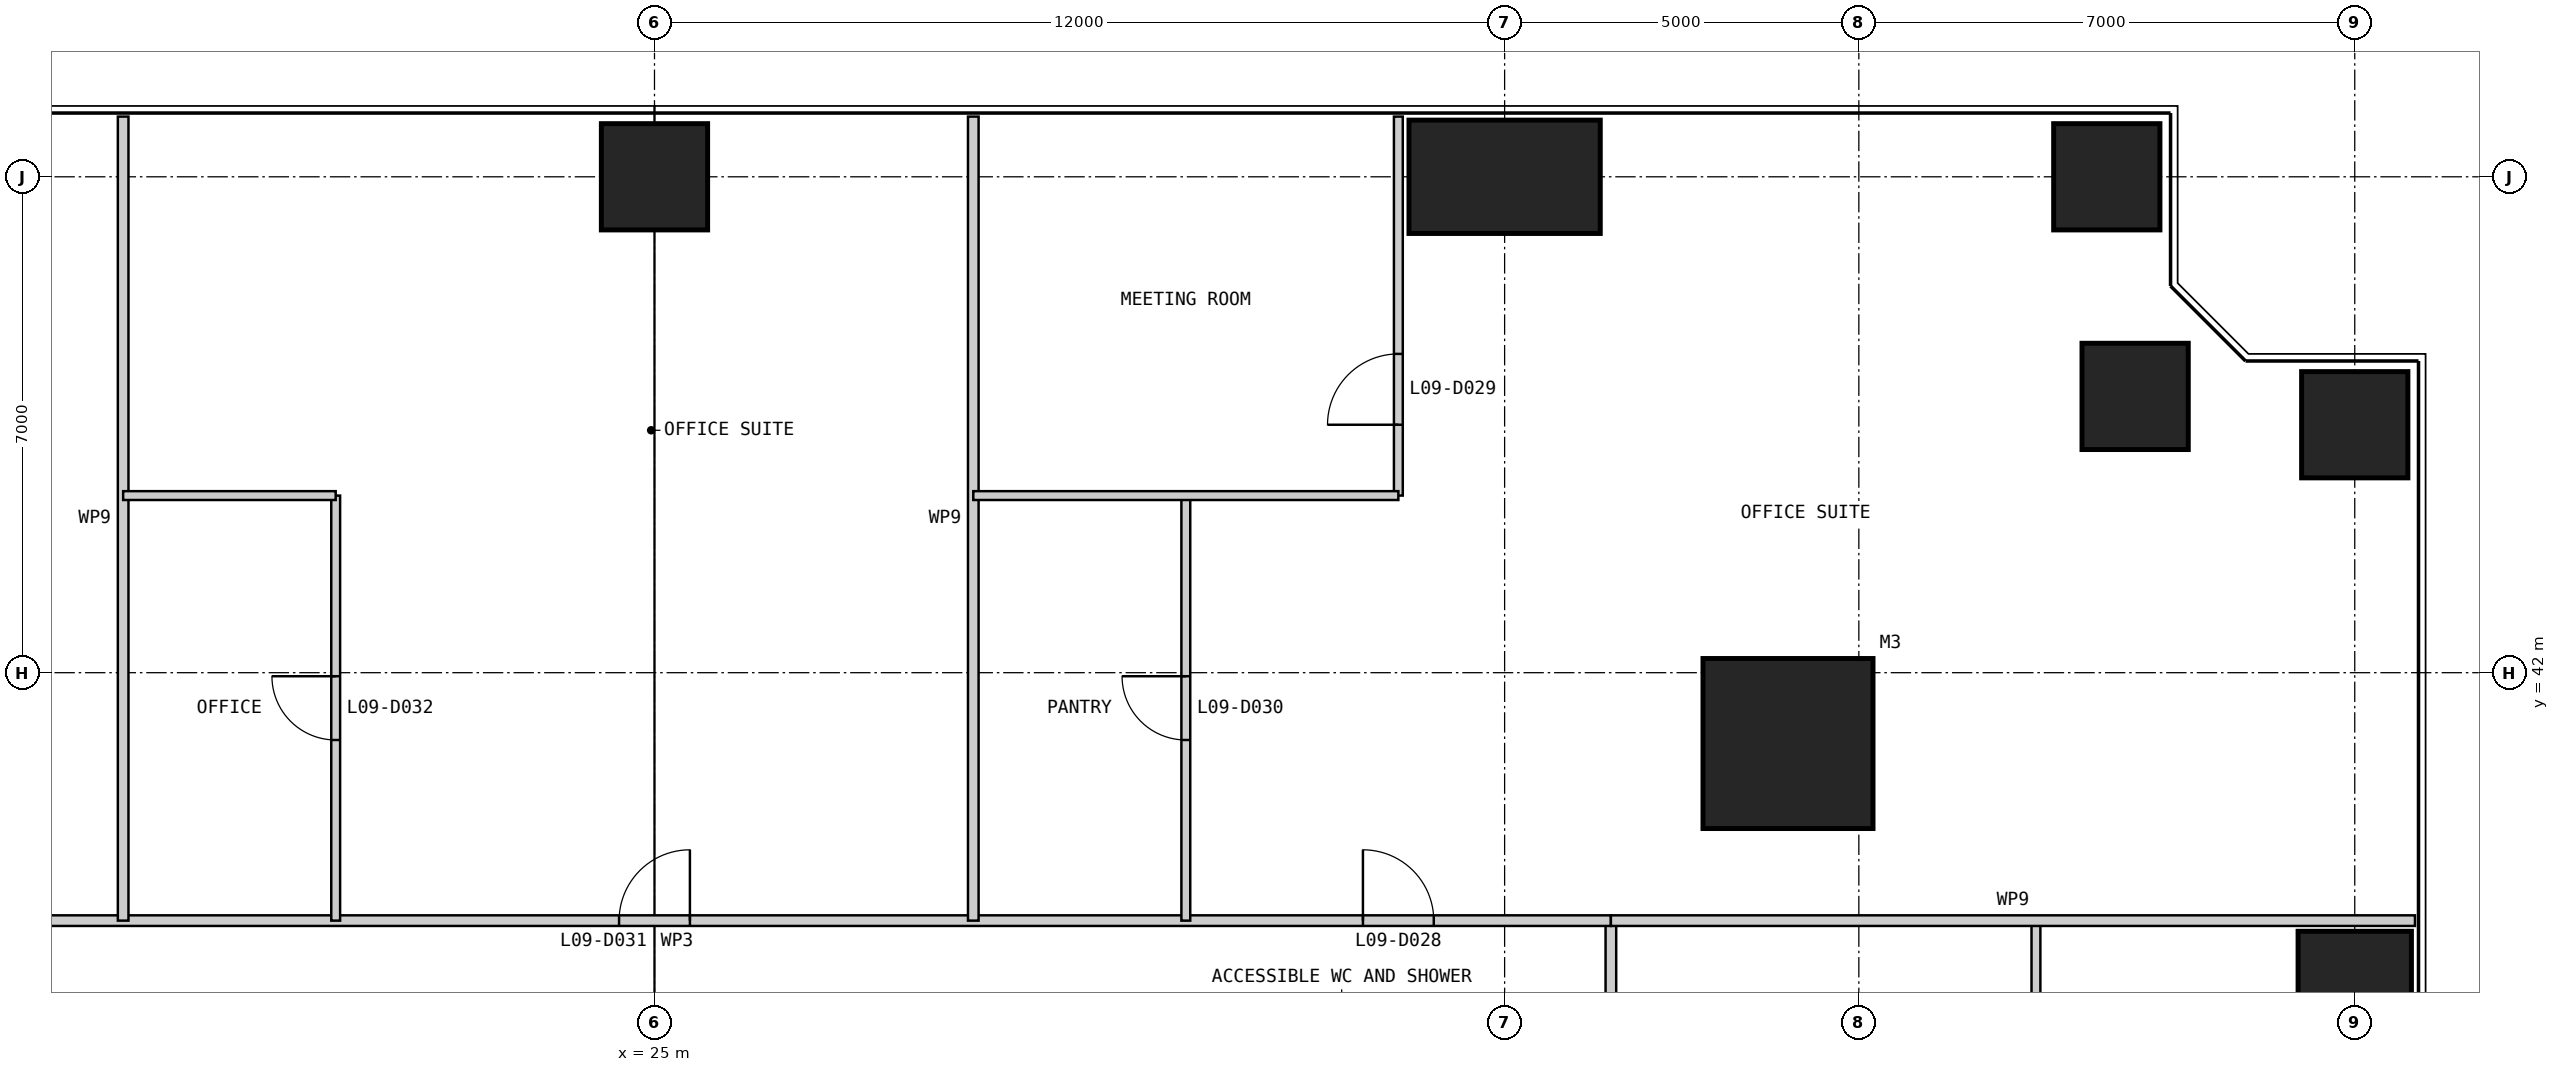
"""IFC4 building model, lengths in metres.
Left out: names, types, materials, properties, quantities, classifications, styles, units other than length and angle.
Written with IfcOpenShell. Run it as: python <this file> out.ifc"""

import sys

from ifc_helpers import new_model, si_unit, direction, frame, frame_2d, origin, origin_2d, place, context, subcontext, project, spatial, rectangle, extrude, element, fill, save


model = new_model("IFC4")
c1 = context("Model", 3, precision=1e-05, world=origin(), true_north=direction((0.0, 1.0)))
c2 = subcontext(c1, "Body", "Model", "MODEL_VIEW")
j1 = project(units=[si_unit("LENGTHUNIT", "METRE"), si_unit("PLANEANGLEUNIT", "RADIAN")], contexts=[c1])
p1 = place(None, origin())
s1 = spatial("IfcSite", under=j1, at=p1, CompositionType="ELEMENT")
p2 = place(p1, origin())
s2 = spatial("IfcBuilding", under=s1, at=p2, CompositionType="ELEMENT")
p3 = place(p2, frame((0.0, 0.0, 43.0)))
s3 = spatial("IfcBuildingStorey", under=s2, at=p3, CompositionType="ELEMENT", Elevation=43.0)
p4 = place(p3, frame((41.0, 41.0, 0.0), z_axis=(0.0, 0.0, 1.0), x_axis=(1.0, 0.0, 0.0)))
e1 = element("IfcColumn", 1, at=p4, inside=s3, PredefinedType="COLUMN", context=c2, shape_type="SweptSolid", body=[
    extrude(rectangle(XDim=2.4, YDim=2.4, at=origin_2d()), origin(), (0.0, 0.0, 1.0), 4.0),
])
p5 = place(p3, frame((49.0, 37.0, 0.0), z_axis=(0.0, 0.0, 1.0), x_axis=(1.0, 0.0, 0.0)))
e2 = element("IfcColumn", 2, at=p5, inside=s3, PredefinedType="COLUMN", context=c2, shape_type="SweptSolid", body=[
    extrude(rectangle(XDim=1.6, YDim=2.7, at=origin_2d()), origin(), (0.0, 0.0, 1.0), 4.0),
])
for number, where, z_axis, x_axis in (
    (3, (49.0, 45.5, 0.0), (0.0, 0.0, 1.0), (1.0, 0.0, 0.0)),
    (4, (45.9, 45.9, 0.0), (0.0, 0.0, 1.0), (1.0, 0.0, 0.0)),
    (5, (45.5, 49.0, 0.0), (0.0, 0.0, 1.0), (1.0, 0.0, 0.0)),
):
    element("IfcColumn", number, at=place(p3, frame(where, z_axis=z_axis, x_axis=x_axis)), inside=s3, PredefinedType="COLUMN", context=c2, shape_type="SweptSolid", body=[
        extrude(rectangle(XDim=1.5, YDim=1.5, at=origin_2d()), origin(), (0.0, 0.0, 1.0), 4.0),
    ])
p6 = place(p3, frame((37.0, 49.0, 0.0), z_axis=(0.0, 0.0, 1.0), x_axis=(1.0, 0.0, 0.0)))
e6 = element("IfcColumn", 6, at=p6, inside=s3, PredefinedType="COLUMN", context=c2, shape_type="SweptSolid", body=[
    extrude(rectangle(XDim=2.7, YDim=1.6, at=origin_2d()), origin(), (0.0, 0.0, 1.0), 4.0),
])
p7 = place(p3, frame((25.0, 49.0, 0.0), z_axis=(0.0, 0.0, 1.0), x_axis=(1.0, 0.0, 0.0)))
e7 = element("IfcColumn", 7, at=p7, inside=s3, PredefinedType="COLUMN", context=c2, shape_type="SweptSolid", body=[
    extrude(rectangle(XDim=1.5, YDim=1.5, at=origin_2d()), origin(), (0.0, 0.0, 1.0), 4.0),
])
p8 = place(p3, frame((38.5, 11.5, 0.0), z_axis=(0.0, 0.0, 1.0), x_axis=(0.0, 1.0, 0.0)))
e8 = element("IfcWall", 8, at=p8, inside=s3, PredefinedType="PARTITIONING", context=c2, shape_type="SweptSolid", body=[
    extrude(rectangle(XDim=27.0, YDim=0.15, at=frame_2d((13.5, 0.0))), origin(), (0.0, 0.0, 1.0), 3.85),
])
p9 = place(p8, frame((11.5, 0.0, 0.0)))
e9 = element("IfcOpeningElement", 9, at=p9, cuts=e8, PredefinedType="OPENING", context=c2, shape_type="SweptSolid", body=[
    extrude(rectangle(XDim=1.0, YDim=2.2, at=frame_2d((0.5, 1.1))), frame((0.0, 0.085, 0.0), z_axis=(0.0, -1.0, 0.0), x_axis=(1.0, 0.0, 0.0)), (0.0, 0.0, 1.0), 0.17),
])
p10 = place(p3, frame((44.5, 14.5, 0.0), z_axis=(0.0, 0.0, 1.0), x_axis=(0.0, 1.0, 0.0)))
e10 = element("IfcWall", 10, at=p10, inside=s3, PredefinedType="PARTITIONING", context=c2, shape_type="SweptSolid", body=[
    extrude(rectangle(XDim=24.0, YDim=0.125, at=frame_2d((12.0, 0.0))), origin(), (0.0, 0.0, 1.0), 3.85),
])
p11 = place(p10, frame((10.05, 0.0, 0.0)))
e11 = element("IfcOpeningElement", 11, at=p11, cuts=e10, PredefinedType="OPENING", context=c2, shape_type="SweptSolid", body=[
    extrude(rectangle(XDim=0.9, YDim=2.2, at=frame_2d((0.45, 1.1))), frame((0.0, 0.073, 0.0), z_axis=(0.0, -1.0, 0.0), x_axis=(1.0, 0.0, 0.0)), (0.0, 0.0, 1.0), 0.145),
])
p12 = place(p10, frame((16.05, 0.0, 0.0)))
e12 = element("IfcOpeningElement", 12, at=p12, cuts=e10, PredefinedType="OPENING", context=c2, shape_type="SweptSolid", body=[
    extrude(rectangle(XDim=0.9, YDim=2.2, at=frame_2d((0.45, 1.1))), frame((0.0, 0.073, 0.0), z_axis=(0.0, -1.0, 0.0), x_axis=(1.0, 0.0, 0.0)), (0.0, 0.0, 1.0), 0.145),
])
p13 = place(p10, frame((19.05, 0.0, 0.0)))
e13 = element("IfcOpeningElement", 13, at=p13, cuts=e10, PredefinedType="OPENING", context=c2, shape_type="SweptSolid", body=[
    extrude(rectangle(XDim=0.9, YDim=2.2, at=frame_2d((0.45, 1.1))), frame((0.0, 0.073, 0.0), z_axis=(0.0, -1.0, 0.0), x_axis=(1.0, 0.0, 0.0)), (0.0, 0.0, 1.0), 0.145),
])
p14 = place(p3, frame((38.5, 38.5, 0.0), z_axis=(0.0, 0.0, 1.0), x_axis=(-1.0, 0.0, 0.0)))
e14 = element("IfcWall", 14, at=p14, inside=s3, PredefinedType="PARTITIONING", context=c2, shape_type="SweptSolid", body=[
    extrude(rectangle(XDim=27.0, YDim=0.15, at=frame_2d((13.5, 0.0))), origin(), (0.0, 0.0, 1.0), 3.85),
])
p15 = place(p14, frame((2.5, 0.0, 0.0)))
e15 = element("IfcOpeningElement", 15, at=p15, cuts=e14, PredefinedType="OPENING", context=c2, shape_type="SweptSolid", body=[
    extrude(rectangle(XDim=1.0, YDim=2.2, at=frame_2d((0.5, 1.1))), frame((0.0, 0.085, 0.0), z_axis=(0.0, -1.0, 0.0), x_axis=(1.0, 0.0, 0.0)), (0.0, 0.0, 1.0), 0.17),
])
p16 = place(p14, frame((13.0, 0.0, 0.0)))
e16 = element("IfcOpeningElement", 16, at=p16, cuts=e14, PredefinedType="OPENING", context=c2, shape_type="SweptSolid", body=[
    extrude(rectangle(XDim=1.0, YDim=2.2, at=frame_2d((0.5, 1.1))), frame((0.0, 0.085, 0.0), z_axis=(0.0, -1.0, 0.0), x_axis=(1.0, 0.0, 0.0)), (0.0, 0.0, 1.0), 0.17),
])
p17 = place(p14, frame((23.5, 0.0, 0.0)))
e17 = element("IfcOpeningElement", 17, at=p17, cuts=e14, PredefinedType="OPENING", context=c2, shape_type="SweptSolid", body=[
    extrude(rectangle(XDim=1.0, YDim=2.2, at=frame_2d((0.5, 1.1))), frame((0.0, 0.085, 0.0), z_axis=(0.0, -1.0, 0.0), x_axis=(1.0, 0.0, 0.0)), (0.0, 0.0, 1.0), 0.17),
])
p18 = place(p3, frame((49.85, 38.5, 0.0), z_axis=(0.0, 0.0, 1.0), x_axis=(-1.0, 0.0, 0.0)))
e18 = element("IfcWall", 18, at=p18, inside=s3, PredefinedType="PARTITIONING", context=c2, shape_type="SweptSolid", body=[
    extrude(rectangle(XDim=11.35, YDim=0.15, at=frame_2d((5.675, 0.0))), origin(), (0.0, 0.0, 1.0), 3.85),
])
p19 = place(p3, frame((35.5, 49.85, 0.0), z_axis=(0.0, 0.0, 1.0), x_axis=(0.0, -1.0, 0.0)))
e19 = element("IfcWall", 19, at=p19, inside=s3, PredefinedType="PARTITIONING", context=c2, shape_type="SweptSolid", body=[
    extrude(rectangle(XDim=5.35, YDim=0.125, at=frame_2d((2.675, 0.0))), origin(), (0.0, 0.0, 1.0), 3.85),
])
p20 = place(p19, frame((3.35, 0.0, 0.0)))
e20 = element("IfcOpeningElement", 20, at=p20, cuts=e19, PredefinedType="OPENING", context=c2, shape_type="SweptSolid", body=[
    extrude(rectangle(XDim=1.0, YDim=2.2, at=frame_2d((0.5, 1.1))), frame((0.0, 0.073, 0.0), z_axis=(0.0, -1.0, 0.0), x_axis=(1.0, 0.0, 0.0)), (0.0, 0.0, 1.0), 0.145),
])
p21 = place(p3, frame((32.5, 44.5, 0.0), z_axis=(0.0, 0.0, 1.0), x_axis=(0.0, -1.0, 0.0)))
e21 = element("IfcWall", 21, at=p21, inside=s3, PredefinedType="PARTITIONING", context=c2, shape_type="SweptSolid", body=[
    extrude(rectangle(XDim=6.0, YDim=0.125, at=frame_2d((3.0, 0.0))), origin(), (0.0, 0.0, 1.0), 3.85),
])
p22 = place(p21, frame((2.55, 0.0, 0.0)))
e22 = element("IfcOpeningElement", 22, at=p22, cuts=e21, PredefinedType="OPENING", context=c2, shape_type="SweptSolid", body=[
    extrude(rectangle(XDim=0.9, YDim=2.2, at=frame_2d((0.45, 1.1))), frame((0.0, 0.073, 0.0), z_axis=(0.0, -1.0, 0.0), x_axis=(1.0, 0.0, 0.0)), (0.0, 0.0, 1.0), 0.145),
])
p23 = place(p3, frame((29.5, 49.85, 0.0), z_axis=(0.0, 0.0, 1.0), x_axis=(0.0, -1.0, 0.0)))
e23 = element("IfcWall", 23, at=p23, inside=s3, PredefinedType="PARTITIONING", context=c2, shape_type="SweptSolid", body=[
    extrude(rectangle(XDim=11.35, YDim=0.15, at=frame_2d((5.675, 0.0))), origin(), (0.0, 0.0, 1.0), 3.85),
])
p24 = place(p3, frame((20.5, 44.5, 0.0), z_axis=(0.0, 0.0, 1.0), x_axis=(0.0, -1.0, 0.0)))
e24 = element("IfcWall", 24, at=p24, inside=s3, PredefinedType="PARTITIONING", context=c2, shape_type="SweptSolid", body=[
    extrude(rectangle(XDim=6.0, YDim=0.125, at=frame_2d((3.0, 0.0))), origin(), (0.0, 0.0, 1.0), 3.85),
])
p25 = place(p24, frame((2.55, 0.0, 0.0)))
e25 = element("IfcOpeningElement", 25, at=p25, cuts=e24, PredefinedType="OPENING", context=c2, shape_type="SweptSolid", body=[
    extrude(rectangle(XDim=0.9, YDim=2.2, at=frame_2d((0.45, 1.1))), frame((0.0, 0.073, 0.0), z_axis=(0.0, -1.0, 0.0), x_axis=(1.0, 0.0, 0.0)), (0.0, 0.0, 1.0), 0.145),
])
p26 = place(p3, frame((17.5, 49.85, 0.0), z_axis=(0.0, 0.0, 1.0), x_axis=(0.0, -1.0, 0.0)))
e26 = element("IfcWall", 26, at=p26, inside=s3, PredefinedType="PARTITIONING", context=c2, shape_type="SweptSolid", body=[
    extrude(rectangle(XDim=11.35, YDim=0.15, at=frame_2d((5.675, 0.0))), origin(), (0.0, 0.0, 1.0), 3.85),
])
p27 = place(p3, frame((35.5, 44.5, 0.0), z_axis=(0.0, 0.0, 1.0), x_axis=(-1.0, 0.0, 0.0)))
e27 = element("IfcWall", 27, at=p27, inside=s3, PredefinedType="PARTITIONING", context=c2, shape_type="SweptSolid", body=[
    extrude(rectangle(XDim=6.0, YDim=0.125, at=frame_2d((3.0, 0.0))), origin(), (0.0, 0.0, 1.0), 3.85),
])
p28 = place(p3, frame((20.5, 44.5, 0.0), z_axis=(0.0, 0.0, 1.0), x_axis=(-1.0, 0.0, 0.0)))
e28 = element("IfcWall", 28, at=p28, inside=s3, PredefinedType="PARTITIONING", context=c2, shape_type="SweptSolid", body=[
    extrude(rectangle(XDim=3.0, YDim=0.125, at=frame_2d((1.5, 0.0))), origin(), (0.0, 0.0, 1.0), 3.85),
])
p29 = place(p15, frame((1.0, 0.0, 0.0), z_axis=(0.0, 0.0, 1.0), x_axis=(-1.0, 0.0, 0.0)))
e29 = element("IfcDoor", 29, at=p29, inside=s3, OperationType="SINGLE_SWING_LEFT", PredefinedType="DOOR", context=c2, shape_type="SweptSolid", body=[
    extrude(rectangle(XDim=1.0, YDim=2.2, at=frame_2d((0.5, 1.1))), frame((0.0, 0.025, 0.0), z_axis=(0.0, -1.0, 0.0), x_axis=(1.0, 0.0, 0.0)), (0.0, 0.0, 1.0), 0.05),
])
fill(e15, e29)
p30 = place(p20, frame((1.0, 0.0, 0.0), z_axis=(0.0, 0.0, 1.0), x_axis=(-1.0, 0.0, 0.0)))
e30 = element("IfcDoor", 30, at=p30, inside=s3, OperationType="SINGLE_SWING_LEFT", PredefinedType="DOOR", context=c2, shape_type="SweptSolid", body=[
    extrude(rectangle(XDim=1.0, YDim=2.2, at=frame_2d((0.5, 1.1))), frame((0.0, 0.025, 0.0), z_axis=(0.0, -1.0, 0.0), x_axis=(1.0, 0.0, 0.0)), (0.0, 0.0, 1.0), 0.05),
])
fill(e20, e30)
p31 = place(p22, frame((0.9, 0.0, 0.0), z_axis=(0.0, 0.0, 1.0), x_axis=(-1.0, 0.0, 0.0)))
e31 = element("IfcDoor", 31, at=p31, inside=s3, OperationType="SINGLE_SWING_RIGHT", PredefinedType="DOOR", context=c2, shape_type="SweptSolid", body=[
    extrude(rectangle(XDim=0.9, YDim=2.2, at=frame_2d((0.45, 1.1))), frame((0.0, 0.025, 0.0), z_axis=(0.0, -1.0, 0.0), x_axis=(1.0, 0.0, 0.0)), (0.0, 0.0, 1.0), 0.05),
])
fill(e22, e31)
p32 = place(p16, frame((1.0, 0.0, 0.0), z_axis=(0.0, 0.0, 1.0), x_axis=(-1.0, 0.0, 0.0)))
e32 = element("IfcDoor", 32, at=p32, inside=s3, OperationType="SINGLE_SWING_RIGHT", PredefinedType="DOOR", context=c2, shape_type="SweptSolid", body=[
    extrude(rectangle(XDim=1.0, YDim=2.2, at=frame_2d((0.5, 1.1))), frame((0.0, 0.025, 0.0), z_axis=(0.0, -1.0, 0.0), x_axis=(1.0, 0.0, 0.0)), (0.0, 0.0, 1.0), 0.05),
])
fill(e16, e32)
p33 = place(p25, frame((0.9, 0.0, 0.0), z_axis=(0.0, 0.0, 1.0), x_axis=(-1.0, 0.0, 0.0)))
e33 = element("IfcDoor", 33, at=p33, inside=s3, OperationType="SINGLE_SWING_RIGHT", PredefinedType="DOOR", context=c2, shape_type="SweptSolid", body=[
    extrude(rectangle(XDim=0.9, YDim=2.2, at=frame_2d((0.45, 1.1))), frame((0.0, 0.025, 0.0), z_axis=(0.0, -1.0, 0.0), x_axis=(1.0, 0.0, 0.0)), (0.0, 0.0, 1.0), 0.05),
])
fill(e25, e33)
save(model, sys.argv[1])
